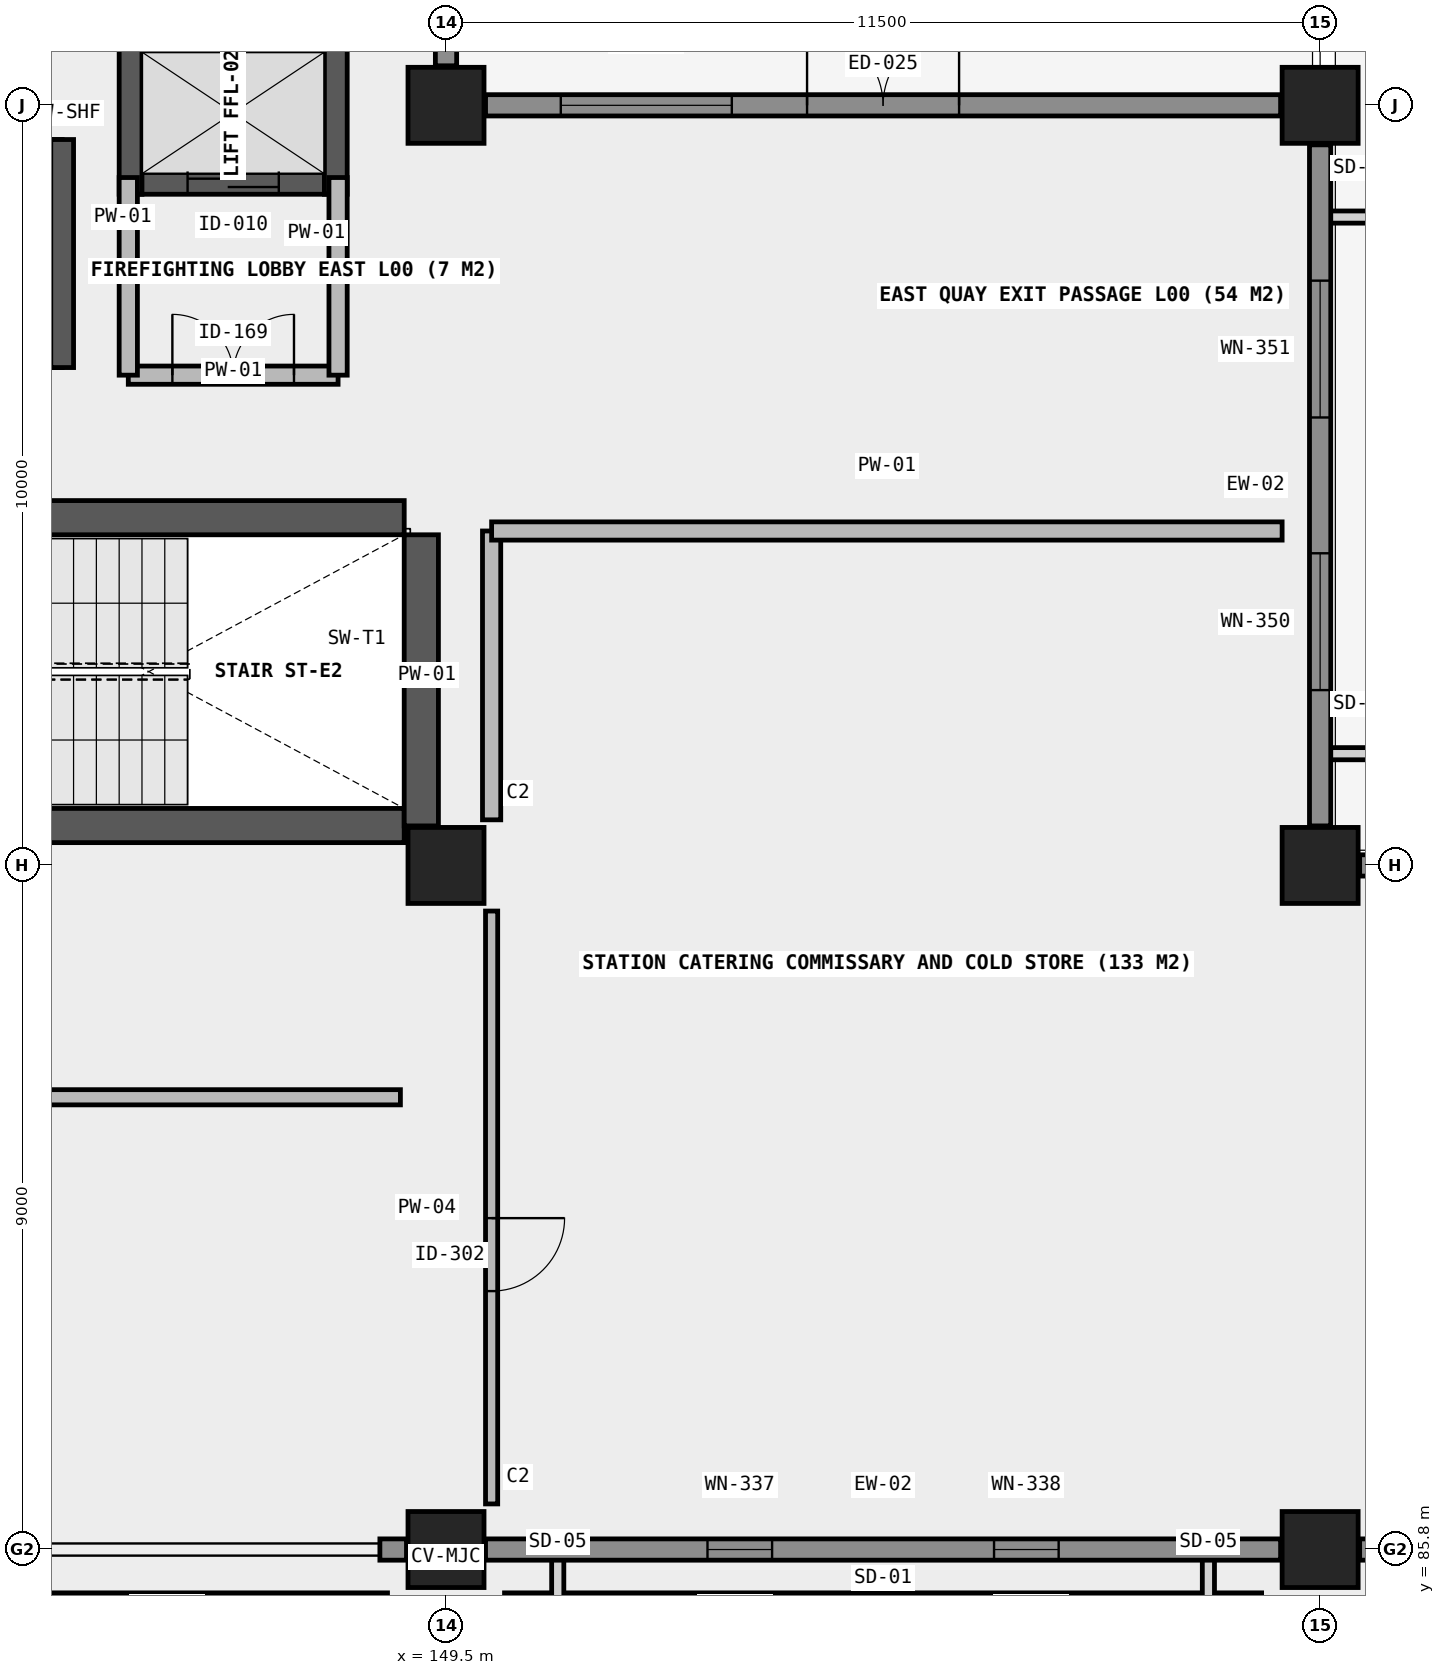
"""IFC4 building model, lengths in metres.
Left out: names, types, materials, properties, quantities, classifications, styles, units other than length and angle.
Written with IfcOpenShell. Run it as: python <this file> out.ifc"""

import sys

from ifc_helpers import new_model, si_unit, direction, frame, frame_2d, origin, origin_2d, place, context, subcontext, project, spatial, rectangle, extrude, element, fill, save


model = new_model("IFC4")
c1 = context("Model", 3, precision=1e-05, world=origin(), true_north=direction((0.0, 1.0)))
c2 = subcontext(c1, "Body", "Model", "MODEL_VIEW")
j1 = project(units=[si_unit("LENGTHUNIT", "METRE"), si_unit("PLANEANGLEUNIT", "RADIAN")], contexts=[c1])
p1 = place(None, origin())
s1 = spatial("IfcSite", under=j1, at=p1, CompositionType="ELEMENT")
p2 = place(p1, origin())
s2 = spatial("IfcBuilding", under=s1, at=p2, CompositionType="ELEMENT")
p3 = place(p2, origin())
s3 = spatial("IfcBuildingStorey", under=s2, at=p3, CompositionType="ELEMENT", Elevation=0.0)
for number, where, z_axis, x_axis in (
    (1, (149.5, 85.8, 0.0), (0.0, 0.0, 1.0), (1.0, 0.0, 0.0)),
    (2, (149.5, 94.8, 0.0), (0.0, 0.0, 1.0), (1.0, 0.0, 0.0)),
    (3, (149.5, 104.8, 0.0), (0.0, 0.0, 1.0), (1.0, 0.0, 0.0)),
    (4, (161.0, 85.8, 0.0), (0.0, 0.0, 1.0), (1.0, 0.0, 0.0)),
    (5, (161.0, 94.8, 0.0), (0.0, 0.0, 1.0), (1.0, 0.0, 0.0)),
    (6, (161.0, 104.8, 0.0), (0.0, 0.0, 1.0), (1.0, 0.0, 0.0)),
):
    element("IfcColumn", number, at=place(p3, frame(where, z_axis=z_axis, x_axis=x_axis)), inside=s3, PredefinedType="COLUMN", context=c2, shape_type="SweptSolid", body=[
        extrude(rectangle(XDim=1.0, YDim=1.0, at=origin_2d()), origin(), (0.0, 0.0, 1.0), 4.2),
    ])
p4 = place(p3, frame((145.35, 103.78, 0.0), z_axis=(0.0, 0.0, 1.0), x_axis=(1.0, 0.0, 0.0)))
e7 = element("IfcWall", 7, at=p4, inside=s3, PredefinedType="SHEAR", context=c2, shape_type="SweptSolid", body=[
    extrude(rectangle(XDim=2.7, YDim=0.3, at=frame_2d((1.35, 0.0))), origin(), (0.0, 0.0, 1.0), 4.2),
])
p5 = place(p4, frame((0.75, 0.0, 0.0)))
e8 = element("IfcOpeningElement", 8, at=p5, cuts=e7, PredefinedType="OPENING", context=c2, shape_type="SweptSolid", body=[
    extrude(rectangle(XDim=1.2, YDim=2.15, at=frame_2d((0.6, 1.075))), frame((0.0, 0.16, 0.0), z_axis=(0.0, -1.0, 0.0), x_axis=(1.0, 0.0, 0.0)), (0.0, 0.0, 1.0), 0.32),
])
p6 = place(p3, frame((145.35, 105.62, 0.0), z_axis=(0.0, 0.0, 1.0), x_axis=(1.0, 0.0, 0.0)))
e9 = element("IfcWall", 9, at=p6, inside=s3, PredefinedType="SHEAR", context=c2, shape_type="SweptSolid", body=[
    extrude(rectangle(XDim=2.7, YDim=0.3, at=frame_2d((1.35, 0.0))), origin(), (0.0, 0.0, 1.0), 4.2),
])
for number, where, z_axis, x_axis in (
    (10, (145.35, 103.63, 0.0), (0.0, 0.0, 1.0), (0.0, 1.0, 0.0)),
    (11, (148.05, 103.63, 0.0), (0.0, 0.0, 1.0), (0.0, 1.0, 0.0)),
):
    element("IfcWall", number, at=place(p3, frame(where, z_axis=z_axis, x_axis=x_axis)), inside=s3, PredefinedType="SHEAR", context=c2, shape_type="SweptSolid", body=[
        extrude(rectangle(XDim=2.14, YDim=0.3, at=frame_2d((1.07, 0.0))), origin(), (0.0, 0.0, 1.0), 4.2),
    ])
p7 = place(p3, frame((142.55, 101.5, 0.0), z_axis=(0.0, 0.0, 1.0), x_axis=(1.0, 0.0, 0.0)))
e12 = element("IfcWall", 12, at=p7, inside=s3, PredefinedType="SHEAR", context=c2, shape_type="SweptSolid", body=[
    extrude(rectangle(XDim=1.9, YDim=0.3, at=frame_2d((0.95, 0.0))), origin(), (0.0, 0.0, 1.0), 4.2),
])
p8 = place(p7, frame((0.4, 0.0, 0.0)))
e13 = element("IfcOpeningElement", 13, at=p8, cuts=e12, PredefinedType="OPENING", context=c2, shape_type="SweptSolid", body=[
    extrude(rectangle(XDim=1.1, YDim=2.15, at=frame_2d((0.55, 1.075))), frame((0.0, 0.16, 0.0), z_axis=(0.0, -1.0, 0.0), x_axis=(1.0, 0.0, 0.0)), (0.0, 0.0, 1.0), 0.32),
])
p9 = place(p3, frame((142.55, 104.2, 0.0), z_axis=(0.0, 0.0, 1.0), x_axis=(1.0, 0.0, 0.0)))
e14 = element("IfcWall", 14, at=p9, inside=s3, PredefinedType="SHEAR", context=c2, shape_type="SweptSolid", body=[
    extrude(rectangle(XDim=1.9, YDim=0.3, at=frame_2d((0.95, 0.0))), origin(), (0.0, 0.0, 1.0), 4.2),
])
p10 = place(p3, frame((144.45, 101.35, 0.0), z_axis=(0.0, 0.0, 1.0), x_axis=(0.0, 1.0, 0.0)))
e15 = element("IfcWall", 15, at=p10, inside=s3, PredefinedType="SHEAR", context=c2, shape_type="SweptSolid", body=[
    extrude(rectangle(XDim=3.0, YDim=0.3, at=frame_2d((1.5, 0.0))), origin(), (0.0, 0.0, 1.0), 4.2),
])
p11 = place(p3, frame((139.85, 95.325, 0.0), z_axis=(0.0, 0.0, 1.0), x_axis=(1.0, 0.0, 0.0)))
e16 = element("IfcWall", 16, at=p11, inside=s3, PredefinedType="SHEAR", context=c2, shape_type="SweptSolid", body=[
    extrude(rectangle(XDim=9.1, YDim=0.45, at=frame_2d((4.55, 0.0))), origin(), (0.0, 0.0, 1.0), 4.2),
])
p12 = place(p3, frame((139.85, 99.375, 0.0), z_axis=(0.0, 0.0, 1.0), x_axis=(1.0, 0.0, 0.0)))
e17 = element("IfcWall", 17, at=p12, inside=s3, PredefinedType="SHEAR", context=c2, shape_type="SweptSolid", body=[
    extrude(rectangle(XDim=9.1, YDim=0.45, at=frame_2d((4.55, 0.0))), origin(), (0.0, 0.0, 1.0), 4.2),
])
p13 = place(p12, frame((0.55, 0.0, 0.0)))
e18 = element("IfcOpeningElement", 18, at=p13, cuts=e17, PredefinedType="OPENING", context=c2, shape_type="SweptSolid", body=[
    extrude(rectangle(XDim=1.13, YDim=2.15, at=frame_2d((0.565, 1.075))), frame((0.0, 0.235, 0.0), z_axis=(0.0, -1.0, 0.0), x_axis=(1.0, 0.0, 0.0)), (0.0, 0.0, 1.0), 0.47),
])
p14 = place(p3, frame((149.175, 95.32, 0.0), z_axis=(0.0, 0.0, 1.0), x_axis=(0.0, 1.0, 0.0)))
e19 = element("IfcWall", 19, at=p14, inside=s3, PredefinedType="SHEAR", context=c2, shape_type="SweptSolid", body=[
    extrude(rectangle(XDim=3.83, YDim=0.45, at=frame_2d((1.915, 0.0))), origin(), (0.0, 0.0, 1.0), 4.2),
])
p15 = place(p3, frame((148.63, 85.8, 0.0), z_axis=(0.0, 0.0, 1.0), x_axis=(1.0, 0.0, 0.0)))
e20 = element("IfcWall", 20, at=p15, inside=s3, PredefinedType="SOLIDWALL", context=c2, shape_type="SweptSolid", body=[
    extrude(rectangle(XDim=0.35, YDim=0.28, at=frame_2d((0.175, 0.0))), origin(), (0.0, 0.0, 1.0), 3.93),
])
p16 = place(p3, frame((150.02, 85.8, 0.0), z_axis=(0.0, 0.0, 1.0), x_axis=(1.0, 0.0, 0.0)))
e21 = element("IfcWall", 21, at=p16, inside=s3, PredefinedType="SOLIDWALL", context=c2, shape_type="SweptSolid", body=[
    extrude(rectangle(XDim=10.46, YDim=0.28, at=frame_2d((5.23, 0.0))), origin(), (0.0, 0.0, 1.0), 3.15),
])
p17 = place(p16, frame((2.92, 0.0, 1.25)))
e22 = element("IfcOpeningElement", 22, at=p17, cuts=e21, PredefinedType="OPENING", context=c2, shape_type="SweptSolid", body=[
    extrude(rectangle(XDim=0.85, YDim=0.95, at=frame_2d((0.425, 0.475))), frame((0.0, 0.15, 0.0), z_axis=(0.0, -1.0, 0.0), x_axis=(1.0, 0.0, 0.0)), (0.0, 0.0, 1.0), 0.3),
])
p18 = place(p16, frame((6.69, 0.0, 1.25)))
e23 = element("IfcOpeningElement", 23, at=p18, cuts=e21, PredefinedType="OPENING", context=c2, shape_type="SweptSolid", body=[
    extrude(rectangle(XDim=0.85, YDim=0.95, at=frame_2d((0.425, 0.475))), frame((0.0, 0.15, 0.0), z_axis=(0.0, -1.0, 0.0), x_axis=(1.0, 0.0, 0.0)), (0.0, 0.0, 1.0), 0.3),
])
p19 = place(p3, frame((161.52, 85.8, 0.0), z_axis=(0.0, 0.0, 1.0), x_axis=(1.0, 0.0, 0.0)))
e24 = element("IfcWall", 24, at=p19, inside=s3, PredefinedType="SOLIDWALL", context=c2, shape_type="SweptSolid", body=[
    extrude(rectangle(XDim=10.46, YDim=0.28, at=frame_2d((5.23, 0.0))), origin(), (0.0, 0.0, 1.0), 3.15),
])
p20 = place(p19, frame((2.92, 0.0, 1.25)))
e25 = element("IfcOpeningElement", 25, at=p20, cuts=e24, PredefinedType="OPENING", context=c2, shape_type="SweptSolid", body=[
    extrude(rectangle(XDim=0.85, YDim=0.95, at=frame_2d((0.425, 0.475))), frame((0.0, 0.15, 0.0), z_axis=(0.0, -1.0, 0.0), x_axis=(1.0, 0.0, 0.0)), (0.0, 0.0, 1.0), 0.3),
])
p21 = place(p19, frame((6.69, 0.0, 1.25)))
e26 = element("IfcOpeningElement", 26, at=p21, cuts=e24, PredefinedType="OPENING", context=c2, shape_type="SweptSolid", body=[
    extrude(rectangle(XDim=0.85, YDim=0.95, at=frame_2d((0.425, 0.475))), frame((0.0, 0.15, 0.0), z_axis=(0.0, -1.0, 0.0), x_axis=(1.0, 0.0, 0.0)), (0.0, 0.0, 1.0), 0.3),
])
p22 = place(p3, frame((161.52, 94.8, 0.0), z_axis=(0.0, 0.0, 1.0), x_axis=(1.0, 0.0, 0.0)))
e27 = element("IfcWall", 27, at=p22, inside=s3, PredefinedType="SOLIDWALL", context=c2, shape_type="SweptSolid", body=[
    extrude(rectangle(XDim=10.46, YDim=0.28, at=frame_2d((5.23, 0.0))), origin(), (0.0, 0.0, 1.0), 3.15),
])
p23 = place(p22, frame((3.607, 0.0, 0.0)))
e28 = element("IfcOpeningElement", 28, at=p23, cuts=e27, PredefinedType="OPENING", context=c2, shape_type="SweptSolid", body=[
    extrude(rectangle(XDim=2.2, YDim=2.5, at=frame_2d((1.1, 1.25))), frame((0.0, 0.15, 0.0), z_axis=(0.0, -1.0, 0.0), x_axis=(1.0, 0.0, 0.0)), (0.0, 0.0, 1.0), 0.3),
])
p24 = place(p3, frame((161.0, 95.32, 0.0), z_axis=(0.0, 0.0, 1.0), x_axis=(0.0, 1.0, 0.0)))
e29 = element("IfcWall", 29, at=p24, inside=s3, PredefinedType="SOLIDWALL", context=c2, shape_type="SweptSolid", body=[
    extrude(rectangle(XDim=8.96, YDim=0.28, at=frame_2d((4.48, 0.0))), origin(), (0.0, 0.0, 1.0), 3.15),
])
p25 = place(p24, frame((1.787, 0.0, 1.25)))
e30 = element("IfcOpeningElement", 30, at=p25, cuts=e29, PredefinedType="OPENING", context=c2, shape_type="SweptSolid", body=[
    extrude(rectangle(XDim=1.8, YDim=1.3, at=frame_2d((0.9, 0.65))), frame((0.0, 0.15, 0.0), z_axis=(0.0, -1.0, 0.0), x_axis=(1.0, 0.0, 0.0)), (0.0, 0.0, 1.0), 0.3),
])
p26 = place(p24, frame((5.373, 0.0, 1.25)))
e31 = element("IfcOpeningElement", 31, at=p26, cuts=e29, PredefinedType="OPENING", context=c2, shape_type="SweptSolid", body=[
    extrude(rectangle(XDim=1.8, YDim=1.3, at=frame_2d((0.9, 0.65))), frame((0.0, 0.15, 0.0), z_axis=(0.0, -1.0, 0.0), x_axis=(1.0, 0.0, 0.0)), (0.0, 0.0, 1.0), 0.3),
])
p27 = place(p3, frame((150.02, 104.8, 0.0), z_axis=(0.0, 0.0, 1.0), x_axis=(1.0, 0.0, 0.0)))
e32 = element("IfcWall", 32, at=p27, inside=s3, PredefinedType="SOLIDWALL", context=c2, shape_type="SweptSolid", body=[
    extrude(rectangle(XDim=10.46, YDim=0.28, at=frame_2d((5.23, 0.0))), origin(), (0.0, 0.0, 1.0), 3.15),
])
p28 = place(p27, frame((4.23, 0.0, 0.0)))
e33 = element("IfcOpeningElement", 33, at=p28, cuts=e32, PredefinedType="OPENING", context=c2, shape_type="SweptSolid", body=[
    extrude(rectangle(XDim=2.0, YDim=2.4, at=frame_2d((1.0, 1.2))), frame((0.0, 0.15, 0.0), z_axis=(0.0, -1.0, 0.0), x_axis=(1.0, 0.0, 0.0)), (0.0, 0.0, 1.0), 0.3),
])
p29 = place(p27, frame((0.99, 0.0, 0.78)))
e34 = element("IfcOpeningElement", 34, at=p29, cuts=e32, PredefinedType="OPENING", context=c2, shape_type="SweptSolid", body=[
    extrude(rectangle(XDim=2.25, YDim=2.05, at=frame_2d((1.125, 1.025))), frame((0.0, 0.15, 0.0), z_axis=(0.0, -1.0, 0.0), x_axis=(1.0, 0.0, 0.0)), (0.0, 0.0, 1.0), 0.3),
])
p30 = place(p3, frame((149.5, 105.32, 0.0), z_axis=(0.0, 0.0, 1.0), x_axis=(0.0, 1.0, 0.0)))
e35 = element("IfcWall", 35, at=p30, inside=s3, PredefinedType="SOLIDWALL", context=c2, shape_type="SweptSolid", body=[
    extrude(rectangle(XDim=8.96, YDim=0.28, at=frame_2d((4.48, 0.0))), origin(), (0.0, 0.0, 1.0), 3.15),
])
p31 = place(p30, frame((1.787, 0.0, 1.25)))
e36 = element("IfcOpeningElement", 36, at=p31, cuts=e35, PredefinedType="OPENING", context=c2, shape_type="SweptSolid", body=[
    extrude(rectangle(XDim=1.8, YDim=1.3, at=frame_2d((0.9, 0.65))), frame((0.0, 0.15, 0.0), z_axis=(0.0, -1.0, 0.0), x_axis=(1.0, 0.0, 0.0)), (0.0, 0.0, 1.0), 0.3),
])
p32 = place(p30, frame((5.373, 0.0, 1.25)))
e37 = element("IfcOpeningElement", 37, at=p32, cuts=e35, PredefinedType="OPENING", context=c2, shape_type="SweptSolid", body=[
    extrude(rectangle(XDim=1.8, YDim=1.3, at=frame_2d((0.9, 0.65))), frame((0.0, 0.15, 0.0), z_axis=(0.0, -1.0, 0.0), x_axis=(1.0, 0.0, 0.0)), (0.0, 0.0, 1.0), 0.3),
])
p33 = place(p3, frame((145.32, 101.25, 0.0), z_axis=(0.0, 0.0, 1.0), x_axis=(1.0, 0.0, 0.0)))
e38 = element("IfcWall", 38, at=p33, inside=s3, PredefinedType="SOLIDWALL", context=c2, shape_type="SweptSolid", body=[
    extrude(rectangle(XDim=2.76, YDim=0.24, at=frame_2d((1.38, 0.0))), origin(), (0.0, 0.0, 1.0), 3.88),
])
p34 = place(p33, frame((0.58, 0.0, 0.0)))
e39 = element("IfcOpeningElement", 39, at=p34, cuts=e38, PredefinedType="OPENING", context=c2, shape_type="SweptSolid", body=[
    extrude(rectangle(XDim=1.6, YDim=2.15, at=frame_2d((0.8, 1.075))), frame((0.0, 0.13, 0.0), z_axis=(0.0, -1.0, 0.0), x_axis=(1.0, 0.0, 0.0)), (0.0, 0.0, 1.0), 0.26),
])
for number, where, z_axis, x_axis in (
    (40, (145.32, 101.25, 0.0), (0.0, 0.0, 1.0), (0.0, 1.0, 0.0)),
    (41, (148.08, 101.25, 0.0), (0.0, 0.0, 1.0), (0.0, 1.0, 0.0)),
):
    element("IfcWall", number, at=place(p3, frame(where, z_axis=z_axis, x_axis=x_axis)), inside=s3, PredefinedType="SOLIDWALL", context=c2, shape_type="SweptSolid", body=[
        extrude(rectangle(XDim=2.6, YDim=0.24, at=frame_2d((1.3, 0.0))), origin(), (0.0, 0.0, 1.0), 3.88),
    ])
p35 = place(p3, frame((118.4, 91.75, 0.0), z_axis=(0.0, 0.0, 1.0), x_axis=(1.0, 0.0, 0.0)))
e42 = element("IfcWall", 42, at=p35, inside=s3, PredefinedType="PARTITIONING", context=c2, shape_type="SweptSolid", body=[
    extrude(rectangle(XDim=30.5, YDim=0.2, at=frame_2d((15.25, 0.0))), origin(), (0.0, 0.0, 1.0), 3.88),
])
p36 = place(p35, frame((4.2, 0.0, 0.0)))
e43 = element("IfcOpeningElement", 43, at=p36, cuts=e42, PredefinedType="OPENING", context=c2, shape_type="SweptSolid", body=[
    extrude(rectangle(XDim=1.8, YDim=2.2, at=frame_2d((0.9, 1.1))), frame((0.0, 0.11, 0.0), z_axis=(0.0, -1.0, 0.0), x_axis=(1.0, 0.0, 0.0)), (0.0, 0.0, 1.0), 0.22),
])
p37 = place(p35, frame((16.5, 0.0, 0.0)))
e44 = element("IfcOpeningElement", 44, at=p37, cuts=e42, PredefinedType="OPENING", context=c2, shape_type="SweptSolid", body=[
    extrude(rectangle(XDim=0.98, YDim=2.15, at=frame_2d((0.49, 1.075))), frame((0.0, 0.11, 0.0), z_axis=(0.0, -1.0, 0.0), x_axis=(1.0, 0.0, 0.0)), (0.0, 0.0, 1.0), 0.22),
])
p38 = place(p3, frame((150.1, 86.4, 0.0), z_axis=(0.0, 0.0, 1.0), x_axis=(0.0, 1.0, 0.0)))
e45 = element("IfcWall", 45, at=p38, inside=s3, PredefinedType="PARTITIONING", context=c2, shape_type="SweptSolid", body=[
    extrude(rectangle(XDim=7.8, YDim=0.16, at=frame_2d((3.9, 0.0))), origin(), (0.0, 0.0, 1.0), 3.88),
])
p39 = place(p38, frame((2.8, 0.0, 0.0)))
e46 = element("IfcOpeningElement", 46, at=p39, cuts=e45, PredefinedType="OPENING", context=c2, shape_type="SweptSolid", body=[
    extrude(rectangle(XDim=0.96, YDim=2.1, at=frame_2d((0.48, 1.05))), frame((0.0, 0.09, 0.0), z_axis=(0.0, -1.0, 0.0), x_axis=(1.0, 0.0, 0.0)), (0.0, 0.0, 1.0), 0.18),
])
p40 = place(p3, frame((150.1, 95.4, 0.0), z_axis=(0.0, 0.0, 1.0), x_axis=(0.0, 1.0, 0.0)))
e47 = element("IfcWall", 47, at=p40, inside=s3, PredefinedType="SOLIDWALL", context=c2, shape_type="SweptSolid", body=[
    extrude(rectangle(XDim=3.8, YDim=0.24, at=frame_2d((1.9, 0.0))), origin(), (0.0, 0.0, 1.0), 3.88),
])
p41 = place(p3, frame((150.1, 99.2, 0.0), z_axis=(0.0, 0.0, 1.0), x_axis=(1.0, 0.0, 0.0)))
e48 = element("IfcWall", 48, at=p41, inside=s3, PredefinedType="SOLIDWALL", context=c2, shape_type="SweptSolid", body=[
    extrude(rectangle(XDim=10.4, YDim=0.24, at=frame_2d((5.2, 0.0))), origin(), (0.0, 0.0, 1.0), 3.88),
])
p42 = place(p17, origin())
e49 = element("IfcWindow", 49, at=p42, inside=s3, PartitioningType="SINGLE_PANEL", PredefinedType="WINDOW", context=c2, shape_type="SweptSolid", body=[
    extrude(rectangle(XDim=0.85, YDim=0.95, at=frame_2d((0.425, 0.475))), frame((0.0, 0.03, 0.0), z_axis=(0.0, -1.0, 0.0), x_axis=(1.0, 0.0, 0.0)), (0.0, 0.0, 1.0), 0.06),
])
fill(e22, e49)
p43 = place(p18, origin())
e50 = element("IfcWindow", 50, at=p43, inside=s3, PartitioningType="SINGLE_PANEL", PredefinedType="WINDOW", context=c2, shape_type="SweptSolid", body=[
    extrude(rectangle(XDim=0.85, YDim=0.95, at=frame_2d((0.425, 0.475))), frame((0.0, 0.03, 0.0), z_axis=(0.0, -1.0, 0.0), x_axis=(1.0, 0.0, 0.0)), (0.0, 0.0, 1.0), 0.06),
])
fill(e23, e50)
p44 = place(p25, origin())
e51 = element("IfcWindow", 51, at=p44, inside=s3, PartitioningType="SINGLE_PANEL", PredefinedType="WINDOW", context=c2, shape_type="SweptSolid", body=[
    extrude(rectangle(XDim=1.8, YDim=1.3, at=frame_2d((0.9, 0.65))), frame((0.0, 0.03, 0.0), z_axis=(0.0, -1.0, 0.0), x_axis=(1.0, 0.0, 0.0)), (0.0, 0.0, 1.0), 0.06),
])
fill(e30, e51)
p45 = place(p26, origin())
e52 = element("IfcWindow", 52, at=p45, inside=s3, PartitioningType="SINGLE_PANEL", PredefinedType="WINDOW", context=c2, shape_type="SweptSolid", body=[
    extrude(rectangle(XDim=1.8, YDim=1.3, at=frame_2d((0.9, 0.65))), frame((0.0, 0.03, 0.0), z_axis=(0.0, -1.0, 0.0), x_axis=(1.0, 0.0, 0.0)), (0.0, 0.0, 1.0), 0.06),
])
fill(e31, e52)
p46 = place(p28, origin())
e53 = element("IfcDoor", 53, at=p46, inside=s3, OperationType="DOUBLE_DOOR_SINGLE_SWING", PredefinedType="DOOR", context=c2, shape_type="SweptSolid", body=[
    extrude(rectangle(XDim=2.0, YDim=2.4, at=frame_2d((1.0, 1.2))), frame((0.0, 0.025, 0.0), z_axis=(0.0, -1.0, 0.0), x_axis=(1.0, 0.0, 0.0)), (0.0, 0.0, 1.0), 0.05),
])
fill(e33, e53)
p47 = place(p29, origin())
e54 = element("IfcWindow", 54, at=p47, inside=s3, PartitioningType="SINGLE_PANEL", PredefinedType="WINDOW", context=c2, shape_type="SweptSolid", body=[
    extrude(rectangle(XDim=2.25, YDim=2.05, at=frame_2d((1.125, 1.025))), frame((0.0, 0.03, 0.0), z_axis=(0.0, -1.0, 0.0), x_axis=(1.0, 0.0, 0.0)), (0.0, 0.0, 1.0), 0.06),
])
fill(e34, e54)
p48 = place(p5, origin())
e55 = element("IfcDoor", 55, at=p48, inside=s3, OperationType="SLIDING_TO_RIGHT", PredefinedType="DOOR", context=c2, shape_type="SweptSolid", body=[
    extrude(rectangle(XDim=1.2, YDim=2.15, at=frame_2d((0.6, 1.075))), frame((0.0, 0.025, 0.0), z_axis=(0.0, -1.0, 0.0), x_axis=(1.0, 0.0, 0.0)), (0.0, 0.0, 1.0), 0.05),
])
fill(e8, e55)
p49 = place(p34, origin())
e56 = element("IfcDoor", 56, at=p49, inside=s3, OperationType="DOUBLE_DOOR_SINGLE_SWING", PredefinedType="DOOR", context=c2, shape_type="SweptSolid", body=[
    extrude(rectangle(XDim=1.6, YDim=2.15, at=frame_2d((0.8, 1.075))), frame((0.0, 0.025, 0.0), z_axis=(0.0, -1.0, 0.0), x_axis=(1.0, 0.0, 0.0)), (0.0, 0.0, 1.0), 0.05),
])
fill(e39, e56)
p50 = place(p39, origin())
e57 = element("IfcDoor", 57, at=p50, inside=s3, OperationType="SINGLE_SWING_RIGHT", PredefinedType="DOOR", context=c2, shape_type="SweptSolid", body=[
    extrude(rectangle(XDim=0.96, YDim=2.1, at=frame_2d((0.48, 1.05))), frame((0.0, 0.025, 0.0), z_axis=(0.0, -1.0, 0.0), x_axis=(1.0, 0.0, 0.0)), (0.0, 0.0, 1.0), 0.05),
])
fill(e46, e57)
save(model, sys.argv[1])
